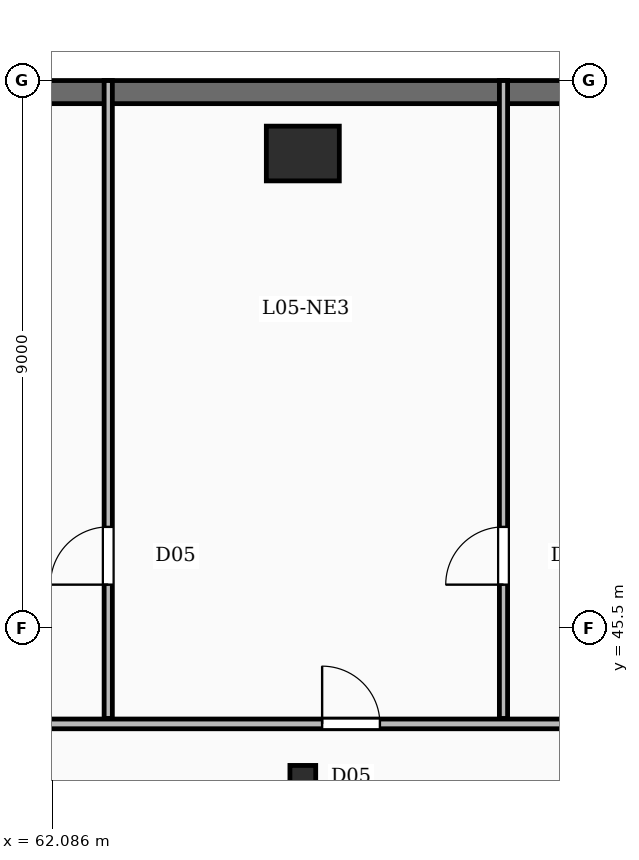
"""IFC4 building model, lengths in metres.
Left out: names, types, materials, properties, quantities, classifications, styles, units other than length and angle.
Written with IfcOpenShell. Run it as: python <this file> out.ifc"""

import sys

from ifc_helpers import new_model, si_unit, direction, frame, frame_2d, origin, origin_2d, place, context, subcontext, project, spatial, rectangle, i_section, extrude, element, fill, save


model = new_model("IFC4")
c1 = context("Model", 3, precision=1e-05, world=origin(), true_north=direction((0.0, 1.0)))
c2 = subcontext(c1, "Body", "Model", "MODEL_VIEW")
j1 = project(units=[si_unit("LENGTHUNIT", "METRE"), si_unit("PLANEANGLEUNIT", "RADIAN")], contexts=[c1])
p1 = place(None, origin())
s1 = spatial("IfcSite", under=j1, at=p1, CompositionType="ELEMENT")
p2 = place(p1, origin())
s2 = spatial("IfcBuilding", under=s1, at=p2, CompositionType="ELEMENT")
p3 = place(p2, frame((0.0, 0.0, 28.0)))
s3 = spatial("IfcBuildingStorey", under=s2, at=p3, CompositionType="ELEMENT", Elevation=28.0)
p4 = place(p3, frame((66.2, 53.3, -0.35), z_axis=(0.0, 0.0, 1.0), x_axis=(1.0, 0.0, 0.0)))
e1 = element("IfcColumn", 1, at=p4, inside=s3, PredefinedType="COLUMN", context=c2, shape_type="SweptSolid", body=[
    extrude(rectangle(XDim=1.2, YDim=0.9, at=origin_2d()), origin(), (0.0, 0.0, 1.0), 5.9),
])
p5 = place(p3, frame((66.2, 43.0, -0.35), z_axis=(0.0, 0.0, 1.0), x_axis=(1.0, 0.0, 0.0)))
e2 = element("IfcColumn", 2, at=p5, inside=s3, PredefinedType="COLUMN", context=c2, shape_type="SweptSolid", body=[
    extrude(i_section(OverallWidth=0.424, OverallDepth=0.474, WebThickness=0.048, FlangeThickness=0.077, FilletRadius=0.02, at=origin_2d()), origin(), (0.0, 0.0, 1.0), 5.9),
])
p6 = place(p3, frame((5.4, 54.31, 0.0), z_axis=(0.0, 0.0, 1.0), x_axis=(1.0, 0.0, 0.0)))
e3 = element("IfcWall", 3, at=p6, inside=s3, PredefinedType="SOLIDWALL", context=c2, shape_type="SweptSolid", body=[
    extrude(rectangle(XDim=68.7, YDim=0.38, at=frame_2d((34.35, 0.0))), origin(), (0.0, 0.0, 1.0), 5.55),
])
p7 = place(p6, frame((24.2, 0.0, 0.95)))
e4 = element("IfcOpeningElement", 4, at=p7, cuts=e3, PredefinedType="OPENING", context=c2, shape_type="SweptSolid", body=[
    extrude(rectangle(XDim=2.2, YDim=2.5, at=frame_2d((1.1, 1.25))), frame((0.0, 0.2, 0.0), z_axis=(0.0, -1.0, 0.0), x_axis=(1.0, 0.0, 0.0)), (0.0, 0.0, 1.0), 0.4),
])
p8 = place(p6, frame((35.0, 0.0, 0.95)))
e5 = element("IfcOpeningElement", 5, at=p8, cuts=e3, PredefinedType="OPENING", context=c2, shape_type="SweptSolid", body=[
    extrude(rectangle(XDim=2.2, YDim=2.5, at=frame_2d((1.1, 1.25))), frame((0.0, 0.2, 0.0), z_axis=(0.0, -1.0, 0.0), x_axis=(1.0, 0.0, 0.0)), (0.0, 0.0, 1.0), 0.4),
])
p9 = place(p6, frame((40.4, 0.0, 0.95)))
e6 = element("IfcOpeningElement", 6, at=p9, cuts=e3, PredefinedType="OPENING", context=c2, shape_type="SweptSolid", body=[
    extrude(rectangle(XDim=2.2, YDim=2.5, at=frame_2d((1.1, 1.25))), frame((0.0, 0.2, 0.0), z_axis=(0.0, -1.0, 0.0), x_axis=(1.0, 0.0, 0.0)), (0.0, 0.0, 1.0), 0.4),
])
p10 = place(p6, frame((51.2, 0.0, 0.95)))
e7 = element("IfcOpeningElement", 7, at=p10, cuts=e3, PredefinedType="OPENING", context=c2, shape_type="SweptSolid", body=[
    extrude(rectangle(XDim=2.2, YDim=2.5, at=frame_2d((1.1, 1.25))), frame((0.0, 0.2, 0.0), z_axis=(0.0, -1.0, 0.0), x_axis=(1.0, 0.0, 0.0)), (0.0, 0.0, 1.0), 0.4),
])
p11 = place(p3, frame((63.0, 44.01, 0.0), z_axis=(0.0, 0.0, 1.0), x_axis=(0.0, 1.0, 0.0)))
e8 = element("IfcWall", 8, at=p11, inside=s3, PredefinedType="PARTITIONING", context=c2, shape_type="SweptSolid", body=[
    extrude(rectangle(XDim=10.49, YDim=0.135, at=frame_2d((5.245, 0.0))), origin(), (0.0, 0.0, 1.0), 4.61),
])
p12 = place(p11, frame((2.2, 0.0, 0.0)))
e9 = element("IfcOpeningElement", 9, at=p12, cuts=e8, PredefinedType="OPENING", context=c2, shape_type="SweptSolid", body=[
    extrude(rectangle(XDim=0.95, YDim=2.15, at=frame_2d((0.475, 1.075))), frame((0.0, 0.077, 0.0), z_axis=(0.0, -1.0, 0.0), x_axis=(1.0, 0.0, 0.0)), (0.0, 0.0, 1.0), 0.155),
])
p13 = place(p3, frame((69.5, 44.01, 0.0), z_axis=(0.0, 0.0, 1.0), x_axis=(0.0, 1.0, 0.0)))
e10 = element("IfcWall", 10, at=p13, inside=s3, PredefinedType="PARTITIONING", context=c2, shape_type="SweptSolid", body=[
    extrude(rectangle(XDim=10.49, YDim=0.135, at=frame_2d((5.245, 0.0))), origin(), (0.0, 0.0, 1.0), 4.61),
])
p14 = place(p13, frame((2.2, 0.0, 0.0)))
e11 = element("IfcOpeningElement", 11, at=p14, cuts=e10, PredefinedType="OPENING", context=c2, shape_type="SweptSolid", body=[
    extrude(rectangle(XDim=0.95, YDim=2.15, at=frame_2d((0.475, 1.075))), frame((0.0, 0.077, 0.0), z_axis=(0.0, -1.0, 0.0), x_axis=(1.0, 0.0, 0.0)), (0.0, 0.0, 1.0), 0.155),
])
p15 = place(p3, frame((49.8, 43.92, 0.0), z_axis=(0.0, 0.0, 1.0), x_axis=(1.0, 0.0, 0.0)))
e12 = element("IfcWall", 12, at=p15, inside=s3, PredefinedType="PARTITIONING", context=c2, shape_type="SweptSolid", body=[
    extrude(rectangle(XDim=29.7, YDim=0.16, at=frame_2d((14.85, 0.0))), origin(), (0.0, 0.0, 1.0), 4.61),
])
p16 = place(p15, frame((2.62, 0.0, 0.0)))
e13 = element("IfcOpeningElement", 13, at=p16, cuts=e12, PredefinedType="OPENING", context=c2, shape_type="SweptSolid", body=[
    extrude(rectangle(XDim=0.95, YDim=2.15, at=frame_2d((0.475, 1.075))), frame((0.0, 0.09, 0.0), z_axis=(0.0, -1.0, 0.0), x_axis=(1.0, 0.0, 0.0)), (0.0, 0.0, 1.0), 0.18),
])
p17 = place(p15, frame((7.85, 0.0, 0.0)))
e14 = element("IfcOpeningElement", 14, at=p17, cuts=e12, PredefinedType="OPENING", context=c2, shape_type="SweptSolid", body=[
    extrude(rectangle(XDim=0.95, YDim=2.15, at=frame_2d((0.475, 1.075))), frame((0.0, 0.09, 0.0), z_axis=(0.0, -1.0, 0.0), x_axis=(1.0, 0.0, 0.0)), (0.0, 0.0, 1.0), 0.18),
])
p18 = place(p15, frame((16.718, 0.0, 0.0)))
e15 = element("IfcOpeningElement", 15, at=p18, cuts=e12, PredefinedType="OPENING", context=c2, shape_type="SweptSolid", body=[
    extrude(rectangle(XDim=0.95, YDim=2.15, at=frame_2d((0.475, 1.075))), frame((0.0, 0.09, 0.0), z_axis=(0.0, -1.0, 0.0), x_axis=(1.0, 0.0, 0.0)), (0.0, 0.0, 1.0), 0.18),
])
p19 = place(p15, frame((21.02, 0.0, 0.0)))
e16 = element("IfcOpeningElement", 16, at=p19, cuts=e12, PredefinedType="OPENING", context=c2, shape_type="SweptSolid", body=[
    extrude(rectangle(XDim=0.95, YDim=2.15, at=frame_2d((0.475, 1.075))), frame((0.0, 0.09, 0.0), z_axis=(0.0, -1.0, 0.0), x_axis=(1.0, 0.0, 0.0)), (0.0, 0.0, 1.0), 0.18),
])
p20 = place(p12, origin())
e17 = element("IfcDoor", 17, at=p20, inside=s3, OperationType="SINGLE_SWING_LEFT", PredefinedType="DOOR", context=c2, shape_type="SweptSolid", body=[
    extrude(rectangle(XDim=0.95, YDim=2.15, at=frame_2d((0.475, 1.075))), frame((0.0, 0.025, 0.0), z_axis=(0.0, -1.0, 0.0), x_axis=(1.0, 0.0, 0.0)), (0.0, 0.0, 1.0), 0.05),
])
fill(e9, e17)
p21 = place(p14, origin())
e18 = element("IfcDoor", 18, at=p21, inside=s3, OperationType="SINGLE_SWING_LEFT", PredefinedType="DOOR", context=c2, shape_type="SweptSolid", body=[
    extrude(rectangle(XDim=0.95, YDim=2.15, at=frame_2d((0.475, 1.075))), frame((0.0, 0.025, 0.0), z_axis=(0.0, -1.0, 0.0), x_axis=(1.0, 0.0, 0.0)), (0.0, 0.0, 1.0), 0.05),
])
fill(e11, e18)
p22 = place(p18, origin())
e19 = element("IfcDoor", 19, at=p22, inside=s3, OperationType="SINGLE_SWING_LEFT", PredefinedType="DOOR", context=c2, shape_type="SweptSolid", body=[
    extrude(rectangle(XDim=0.95, YDim=2.15, at=frame_2d((0.475, 1.075))), frame((0.0, 0.025, 0.0), z_axis=(0.0, -1.0, 0.0), x_axis=(1.0, 0.0, 0.0)), (0.0, 0.0, 1.0), 0.05),
])
fill(e15, e19)
save(model, sys.argv[1])
